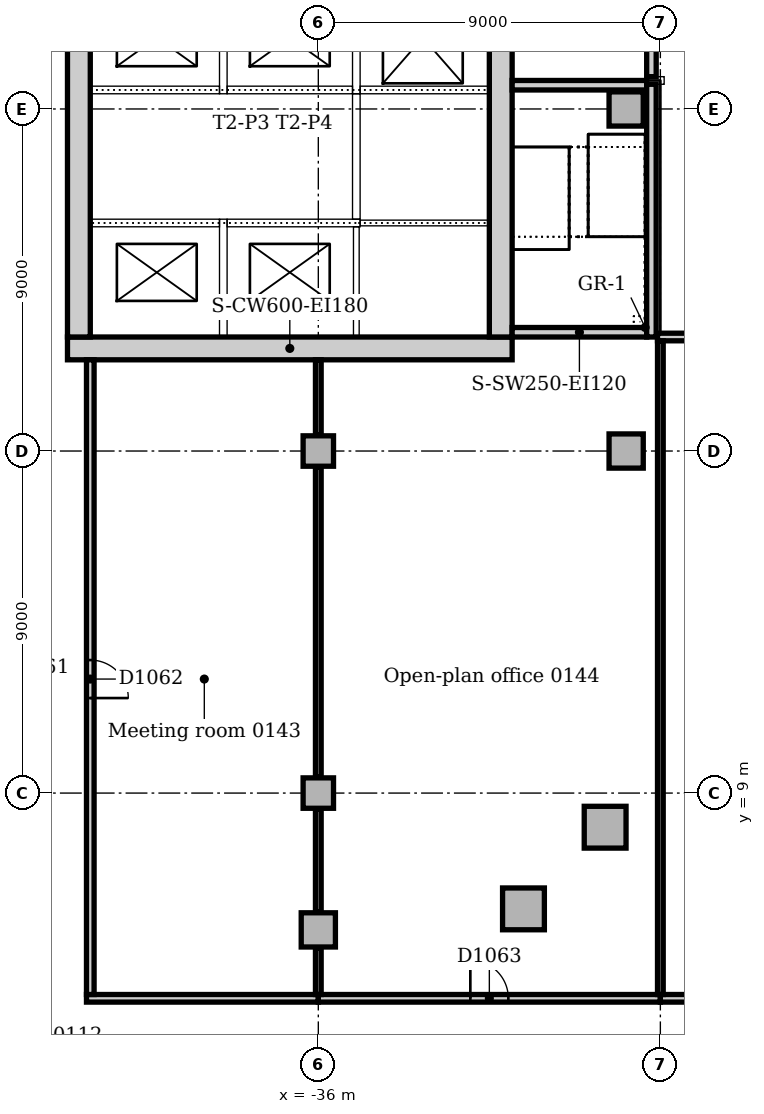
"""IFC4 building model, lengths in metres.
Left out: names, types, materials, properties, quantities, classifications, styles, units other than length and angle.
Written with IfcOpenShell. Run it as: python <this file> out.ifc"""

import sys

from ifc_helpers import new_model, si_unit, direction, frame, frame_2d, origin, origin_2d, place, context, subcontext, project, spatial, rectangle, extrude, element, fill, save


model = new_model("IFC4")
c1 = context("Model", 3, precision=1e-05, world=origin(), true_north=direction((0.0, 1.0)))
c2 = subcontext(c1, "Body", "Model", "MODEL_VIEW")
j1 = project(units=[si_unit("LENGTHUNIT", "METRE"), si_unit("PLANEANGLEUNIT", "RADIAN")], contexts=[c1])
p1 = place(None, origin())
s1 = spatial("IfcSite", under=j1, at=p1, CompositionType="ELEMENT")
p2 = place(p1, origin())
s2 = spatial("IfcBuilding", under=s1, at=p2, CompositionType="ELEMENT")
p3 = place(p2, frame((0.0, 0.0, 6.0)))
s3 = spatial("IfcBuildingStorey", under=s2, at=p3, CompositionType="ELEMENT", Elevation=6.0)
p4 = place(p3, frame((-42.6, 20.7, 0.0), z_axis=(0.0, 0.0, 1.0), x_axis=(1.0, 0.0, 0.0)))
e1 = element("IfcWall", 1, at=p4, inside=s3, PredefinedType="SOLIDWALL", context=c2, shape_type="SweptSolid", body=[
    extrude(rectangle(XDim=11.7, YDim=0.6, at=frame_2d((5.85, 0.0))), origin(), (0.0, 0.0, 1.0), 5.0),
])
p5 = place(p3, frame((-31.2, 21.0, 0.0), z_axis=(0.0, 0.0, 1.0), x_axis=(0.0, 1.0, 0.0)))
e2 = element("IfcWall", 2, at=p5, inside=s3, PredefinedType="SOLIDWALL", context=c2, shape_type="SweptSolid", body=[
    extrude(rectangle(XDim=9.5, YDim=0.6, at=frame_2d((4.75, 0.0))), origin(), (0.0, 0.0, 1.0), 5.0),
])
p6 = place(p5, frame((5.25, 0.0, 0.0)))
e3 = element("IfcOpeningElement", 3, at=p6, cuts=e2, PredefinedType="OPENING", context=c2, shape_type="SweptSolid", body=[
    extrude(rectangle(XDim=1.0, YDim=2.1, at=frame_2d((0.5, 1.05))), frame((0.0, 0.31, 0.0), z_axis=(0.0, -1.0, 0.0), x_axis=(1.0, 0.0, 0.0)), (0.0, 0.0, 1.0), 0.62),
])
p7 = place(p3, frame((-42.3, 30.5, 0.0), z_axis=(0.0, 0.0, 1.0), x_axis=(0.0, -1.0, 0.0)))
e4 = element("IfcWall", 4, at=p7, inside=s3, PredefinedType="SOLIDWALL", context=c2, shape_type="SweptSolid", body=[
    extrude(rectangle(XDim=9.5, YDim=0.6, at=frame_2d((4.75, 0.0))), origin(), (0.0, 0.0, 1.0), 5.0),
])
p8 = place(p7, frame((3.85, 0.0, 0.0)))
e5 = element("IfcOpeningElement", 5, at=p8, cuts=e4, PredefinedType="OPENING", context=c2, shape_type="SweptSolid", body=[
    extrude(rectangle(XDim=1.8, YDim=2.1, at=frame_2d((0.9, 1.05))), frame((0.0, 0.31, 0.0), z_axis=(0.0, -1.0, 0.0), x_axis=(1.0, 0.0, 0.0)), (0.0, 0.0, 1.0), 0.62),
])
p9 = place(p3, frame((-30.9, 21.125, 0.0), z_axis=(0.0, 0.0, 1.0), x_axis=(1.0, 0.0, 0.0)))
e6 = element("IfcWall", 6, at=p9, inside=s3, PredefinedType="SOLIDWALL", context=c2, shape_type="SweptSolid", body=[
    extrude(rectangle(XDim=3.54, YDim=0.25, at=frame_2d((1.77, 0.0))), origin(), (0.0, 0.0, 1.0), 5.0),
])
p10 = place(p3, frame((-27.36, 27.625, 0.0), z_axis=(0.0, 0.0, 1.0), x_axis=(-1.0, 0.0, 0.0)))
e7 = element("IfcWall", 7, at=p10, inside=s3, PredefinedType="SOLIDWALL", context=c2, shape_type="SweptSolid", body=[
    extrude(rectangle(XDim=3.54, YDim=0.25, at=frame_2d((1.77, 0.0))), origin(), (0.0, 0.0, 1.0), 5.0),
])
p11 = place(p10, frame((1.69, 0.0, 0.0)))
e8 = element("IfcOpeningElement", 8, at=p11, cuts=e7, PredefinedType="OPENING", context=c2, shape_type="SweptSolid", body=[
    extrude(rectangle(XDim=1.1, YDim=2.1, at=frame_2d((0.55, 1.05))), frame((0.0, 0.135, 0.0), z_axis=(0.0, -1.0, 0.0), x_axis=(1.0, 0.0, 0.0)), (0.0, 0.0, 1.0), 0.27),
])
p12 = place(p3, frame((-27.235, 21.0, 0.0), z_axis=(0.0, 0.0, 1.0), x_axis=(0.0, 1.0, 0.0)))
e9 = element("IfcWall", 9, at=p12, inside=s3, PredefinedType="SOLIDWALL", context=c2, shape_type="SweptSolid", body=[
    extrude(rectangle(XDim=6.65, YDim=0.25, at=frame_2d((3.325, 0.0))), origin(), (0.0, 0.0, 1.0), 5.0),
])
p13 = place(p3, frame((-27.235, 27.85, 0.0), z_axis=(0.0, 0.0, 1.0), x_axis=(0.0, 1.0, 0.0)))
e10 = element("IfcWall", 10, at=p13, inside=s3, PredefinedType="SOLIDWALL", context=c2, shape_type="SweptSolid", body=[
    extrude(rectangle(XDim=7.3, YDim=0.25, at=frame_2d((3.65, 0.0))), origin(), (0.0, 0.0, 1.0), 5.0),
])
for number, where, z_axis, x_axis in (
    (11, (-30.602, 5.953, 0.0), (0.0, 0.0, 1.0), (1.0, 0.0, 0.0)),
    (12, (-28.453, 8.102, 0.0), (0.0, 0.0, 1.0), (1.0, 0.0, 0.0)),
):
    element("IfcColumn", number, at=place(p3, frame(where, z_axis=z_axis, x_axis=x_axis)), inside=s3, PredefinedType="COLUMN", context=c2, shape_type="SweptSolid", body=[
        extrude(rectangle(XDim=1.1, YDim=1.1, at=origin_2d()), origin(), (0.0, 0.0, 1.0), 4.7),
    ])
for number, where, z_axis, x_axis in (
    (13, (-36.0, 5.4, 0.0), (0.0, 0.0, 1.0), (1.0, 0.0, 0.0)),
    (14, (-27.9, 18.0, 0.0), (0.0, 0.0, 1.0), (1.0, 0.0, 0.0)),
):
    element("IfcColumn", number, at=place(p3, frame(where, z_axis=z_axis, x_axis=x_axis)), inside=s3, PredefinedType="COLUMN", context=c2, shape_type="SweptSolid", body=[
        extrude(rectangle(XDim=0.9, YDim=0.9, at=origin_2d()), origin(), (0.0, 0.0, 1.0), 4.7),
    ])
p14 = place(p3, frame((-27.9, 27.0, 0.0), z_axis=(0.0, 0.0, 1.0), x_axis=(1.0, 0.0, 0.0)))
e15 = element("IfcColumn", 15, at=p14, inside=s3, PredefinedType="COLUMN", context=c2, shape_type="SweptSolid", body=[
    extrude(rectangle(XDim=0.9, YDim=0.9, at=origin_2d()), origin(), (0.0, 0.0, 1.0), 5.0),
])
for number, where, z_axis, x_axis in (
    (16, (-36.0, 9.0, 0.0), (0.0, 0.0, 1.0), (1.0, 0.0, 0.0)),
    (17, (-36.0, 18.0, 0.0), (0.0, 0.0, 1.0), (1.0, 0.0, 0.0)),
):
    element("IfcColumn", number, at=place(p3, frame(where, z_axis=z_axis, x_axis=x_axis)), inside=s3, PredefinedType="COLUMN", context=c2, shape_type="SweptSolid", body=[
        extrude(rectangle(XDim=0.8, YDim=0.8, at=origin_2d()), origin(), (0.0, 0.0, 1.0), 4.7),
    ])
p15 = place(p3, frame((-42.1, 3.6, 0.0), z_axis=(0.0, 0.0, 1.0), x_axis=(1.0, 0.0, 0.0)))
e18 = element("IfcWall", 18, at=p15, inside=s3, PredefinedType="PARTITIONING", context=c2, shape_type="SweptSolid", body=[
    extrude(rectangle(XDim=6.1, YDim=0.2, at=frame_2d((3.05, 0.0))), origin(), (0.0, 0.0, 1.0), 4.7),
])
p16 = place(p3, frame((-36.0, 3.6, 0.0), z_axis=(0.0, 0.0, 1.0), x_axis=(1.0, 0.0, 0.0)))
e19 = element("IfcWall", 19, at=p16, inside=s3, PredefinedType="PARTITIONING", context=c2, shape_type="SweptSolid", body=[
    extrude(rectangle(XDim=9.0, YDim=0.2, at=frame_2d((4.5, 0.0))), origin(), (0.0, 0.0, 1.0), 4.7),
])
p17 = place(p16, frame((4.0, 0.0, 0.0)))
e20 = element("IfcOpeningElement", 20, at=p17, cuts=e19, PredefinedType="OPENING", context=c2, shape_type="SweptSolid", body=[
    extrude(rectangle(XDim=1.0, YDim=2.1, at=frame_2d((0.5, 1.05))), frame((0.0, 0.11, 0.0), z_axis=(0.0, -1.0, 0.0), x_axis=(1.0, 0.0, 0.0)), (0.0, 0.0, 1.0), 0.22),
])
p18 = place(p3, frame((-42.0, 3.7, 0.0), z_axis=(0.0, 0.0, 1.0), x_axis=(0.0, 1.0, 0.0)))
e21 = element("IfcWall", 21, at=p18, inside=s3, PredefinedType="PARTITIONING", context=c2, shape_type="SweptSolid", body=[
    extrude(rectangle(XDim=16.7, YDim=0.2, at=frame_2d((8.35, 0.0))), origin(), (0.0, 0.0, 1.0), 4.7),
])
p19 = place(p18, frame((7.8, 0.0, 0.0)))
e22 = element("IfcOpeningElement", 22, at=p19, cuts=e21, PredefinedType="OPENING", context=c2, shape_type="SweptSolid", body=[
    extrude(rectangle(XDim=1.0, YDim=2.1, at=frame_2d((0.5, 1.05))), frame((0.0, 0.11, 0.0), z_axis=(0.0, -1.0, 0.0), x_axis=(1.0, 0.0, 0.0)), (0.0, 0.0, 1.0), 0.22),
])
p20 = place(p3, frame((-27.0, 3.6, 0.0), z_axis=(0.0, 0.0, 1.0), x_axis=(1.0, 0.0, 0.0)))
e23 = element("IfcWall", 23, at=p20, inside=s3, PredefinedType="PARTITIONING", context=c2, shape_type="SweptSolid", body=[
    extrude(rectangle(XDim=9.0, YDim=0.2, at=frame_2d((4.5, 0.0))), origin(), (0.0, 0.0, 1.0), 4.7),
])
p21 = place(p20, frame((4.0, 0.0, 0.0)))
e24 = element("IfcOpeningElement", 24, at=p21, cuts=e23, PredefinedType="OPENING", context=c2, shape_type="SweptSolid", body=[
    extrude(rectangle(XDim=1.0, YDim=2.1, at=frame_2d((0.5, 1.05))), frame((0.0, 0.11, 0.0), z_axis=(0.0, -1.0, 0.0), x_axis=(1.0, 0.0, 0.0)), (0.0, 0.0, 1.0), 0.22),
])
p22 = place(p3, frame((-27.075, 21.0, 0.0), z_axis=(0.0, 0.0, 1.0), x_axis=(1.0, 0.0, 0.0)))
e25 = element("IfcWall", 25, at=p22, inside=s3, PredefinedType="PARTITIONING", context=c2, shape_type="SweptSolid", body=[
    extrude(rectangle(XDim=9.075, YDim=0.2, at=frame_2d((4.537, 0.0))), origin(), (0.0, 0.0, 1.0), 4.7),
])
p23 = place(p3, frame((-27.0, 3.7, 0.0), z_axis=(0.0, 0.0, 1.0), x_axis=(0.0, 1.0, 0.0)))
e26 = element("IfcWall", 26, at=p23, inside=s3, PredefinedType="PARTITIONING", context=c2, shape_type="SweptSolid", body=[
    extrude(rectangle(XDim=17.2, YDim=0.15, at=frame_2d((8.6, 0.0))), origin(), (0.0, 0.0, 1.0), 4.7),
])
p24 = place(p3, frame((-36.0, 3.7, 0.0), z_axis=(0.0, 0.0, 1.0), x_axis=(0.0, 1.0, 0.0)))
e27 = element("IfcWall", 27, at=p24, inside=s3, PredefinedType="PARTITIONING", context=c2, shape_type="SweptSolid", body=[
    extrude(rectangle(XDim=1.23, YDim=0.15, at=frame_2d((0.615, 0.0))), origin(), (0.0, 0.0, 1.0), 4.7),
])
p25 = place(p3, frame((-36.0, 5.87, 0.0), z_axis=(0.0, 0.0, 1.0), x_axis=(0.0, 1.0, 0.0)))
e28 = element("IfcWall", 28, at=p25, inside=s3, PredefinedType="PARTITIONING", context=c2, shape_type="SweptSolid", body=[
    extrude(rectangle(XDim=2.71, YDim=0.15, at=frame_2d((1.355, 0.0))), origin(), (0.0, 0.0, 1.0), 4.7),
])
p26 = place(p3, frame((-36.0, 9.42, 0.0), z_axis=(0.0, 0.0, 1.0), x_axis=(0.0, 1.0, 0.0)))
e29 = element("IfcWall", 29, at=p26, inside=s3, PredefinedType="PARTITIONING", context=c2, shape_type="SweptSolid", body=[
    extrude(rectangle(XDim=8.16, YDim=0.15, at=frame_2d((4.08, 0.0))), origin(), (0.0, 0.0, 1.0), 4.7),
])
p27 = place(p3, frame((-36.0, 18.42, 0.0), z_axis=(0.0, 0.0, 1.0), x_axis=(0.0, 1.0, 0.0)))
e30 = element("IfcWall", 30, at=p27, inside=s3, PredefinedType="PARTITIONING", context=c2, shape_type="SweptSolid", body=[
    extrude(rectangle(XDim=1.98, YDim=0.15, at=frame_2d((0.99, 0.0))), origin(), (0.0, 0.0, 1.0), 4.7),
])
p28 = place(p3, frame((-38.5, 21.0, 0.0), z_axis=(0.0, 0.0, 1.0), x_axis=(0.0, 1.0, 0.0)))
e31 = element("IfcWall", 31, at=p28, inside=s3, PredefinedType="SOLIDWALL", context=c2, shape_type="SweptSolid", body=[
    extrude(rectangle(XDim=3.1, YDim=0.2, at=frame_2d((1.55, 0.0))), origin(), (0.0, 0.0, 1.0), 5.0),
])
p29 = place(p3, frame((-38.6, 24.0, 0.0), z_axis=(0.0, 0.0, 1.0), x_axis=(-1.0, 0.0, 0.0)))
e32 = element("IfcWall", 32, at=p29, inside=s3, PredefinedType="SOLIDWALL", context=c2, shape_type="SweptSolid", body=[
    extrude(rectangle(XDim=3.4, YDim=0.2, at=frame_2d((1.7, 0.0))), origin(), (0.0, 0.0, 1.0), 5.0),
])
p30 = place(p29, frame((0.8, 0.0, 0.0)))
e33 = element("IfcOpeningElement", 33, at=p30, cuts=e32, PredefinedType="OPENING", context=c2, shape_type="SweptSolid", body=[
    extrude(rectangle(XDim=1.1, YDim=2.1, at=frame_2d((0.55, 1.05))), frame((0.0, 0.11, 0.0), z_axis=(0.0, -1.0, 0.0), x_axis=(1.0, 0.0, 0.0)), (0.0, 0.0, 1.0), 0.22),
])
p31 = place(p3, frame((-34.9, 24.0, 0.0), z_axis=(0.0, 0.0, 1.0), x_axis=(-1.0, 0.0, 0.0)))
e34 = element("IfcWall", 34, at=p31, inside=s3, PredefinedType="SOLIDWALL", context=c2, shape_type="SweptSolid", body=[
    extrude(rectangle(XDim=3.5, YDim=0.2, at=frame_2d((1.75, 0.0))), origin(), (0.0, 0.0, 1.0), 5.0),
])
p32 = place(p31, frame((1.3, 0.0, 0.0)))
e35 = element("IfcOpeningElement", 35, at=p32, cuts=e34, PredefinedType="OPENING", context=c2, shape_type="SweptSolid", body=[
    extrude(rectangle(XDim=1.1, YDim=2.1, at=frame_2d((0.55, 1.05))), frame((0.0, 0.11, 0.0), z_axis=(0.0, -1.0, 0.0), x_axis=(1.0, 0.0, 0.0)), (0.0, 0.0, 1.0), 0.22),
])
p33 = place(p3, frame((-38.5, 27.4, 0.0), z_axis=(0.0, 0.0, 1.0), x_axis=(0.0, 1.0, 0.0)))
e36 = element("IfcWall", 36, at=p33, inside=s3, PredefinedType="SOLIDWALL", context=c2, shape_type="SweptSolid", body=[
    extrude(rectangle(XDim=2.85, YDim=0.2, at=frame_2d((1.425, 0.0))), origin(), (0.0, 0.0, 1.0), 5.0),
])
p34 = place(p3, frame((-42.0, 27.5, 0.0), z_axis=(0.0, 0.0, 1.0), x_axis=(1.0, 0.0, 0.0)))
e37 = element("IfcWall", 37, at=p34, inside=s3, PredefinedType="SOLIDWALL", context=c2, shape_type="SweptSolid", body=[
    extrude(rectangle(XDim=3.4, YDim=0.2, at=frame_2d((1.7, 0.0))), origin(), (0.0, 0.0, 1.0), 5.0),
])
p35 = place(p34, frame((1.5, 0.0, 0.0)))
e38 = element("IfcOpeningElement", 38, at=p35, cuts=e37, PredefinedType="OPENING", context=c2, shape_type="SweptSolid", body=[
    extrude(rectangle(XDim=1.1, YDim=2.1, at=frame_2d((0.55, 1.05))), frame((0.0, 0.11, 0.0), z_axis=(0.0, -1.0, 0.0), x_axis=(1.0, 0.0, 0.0)), (0.0, 0.0, 1.0), 0.22),
])
p36 = place(p3, frame((-35.0, 27.4, 0.0), z_axis=(0.0, 0.0, 1.0), x_axis=(0.0, 1.0, 0.0)))
e39 = element("IfcWall", 39, at=p36, inside=s3, PredefinedType="SOLIDWALL", context=c2, shape_type="SweptSolid", body=[
    extrude(rectangle(XDim=2.85, YDim=0.2, at=frame_2d((1.425, 0.0))), origin(), (0.0, 0.0, 1.0), 5.0),
])
p37 = place(p3, frame((-38.4, 27.5, 0.0), z_axis=(0.0, 0.0, 1.0), x_axis=(1.0, 0.0, 0.0)))
e40 = element("IfcWall", 40, at=p37, inside=s3, PredefinedType="SOLIDWALL", context=c2, shape_type="SweptSolid", body=[
    extrude(rectangle(XDim=3.3, YDim=0.2, at=frame_2d((1.65, 0.0))), origin(), (0.0, 0.0, 1.0), 5.0),
])
p38 = place(p37, frame((1.1, 0.0, 0.0)))
e41 = element("IfcOpeningElement", 41, at=p38, cuts=e40, PredefinedType="OPENING", context=c2, shape_type="SweptSolid", body=[
    extrude(rectangle(XDim=1.1, YDim=2.1, at=frame_2d((0.55, 1.05))), frame((0.0, 0.11, 0.0), z_axis=(0.0, -1.0, 0.0), x_axis=(1.0, 0.0, 0.0)), (0.0, 0.0, 1.0), 0.22),
])
p39 = place(p3, frame((-34.9, 27.5, 0.0), z_axis=(0.0, 0.0, 1.0), x_axis=(1.0, 0.0, 0.0)))
e42 = element("IfcWall", 42, at=p39, inside=s3, PredefinedType="SOLIDWALL", context=c2, shape_type="SweptSolid", body=[
    extrude(rectangle(XDim=3.4, YDim=0.2, at=frame_2d((1.7, 0.0))), origin(), (0.0, 0.0, 1.0), 5.0),
])
p40 = place(p39, frame((1.1, 0.0, 0.0)))
e43 = element("IfcOpeningElement", 43, at=p40, cuts=e42, PredefinedType="OPENING", context=c2, shape_type="SweptSolid", body=[
    extrude(rectangle(XDim=1.1, YDim=2.1, at=frame_2d((0.55, 1.05))), frame((0.0, 0.11, 0.0), z_axis=(0.0, -1.0, 0.0), x_axis=(1.0, 0.0, 0.0)), (0.0, 0.0, 1.0), 0.22),
])
p41 = place(p3, frame((-35.0, 24.1, 0.0), z_axis=(0.0, 0.0, 1.0), x_axis=(0.0, 1.0, 0.0)))
e44 = element("IfcWall", 44, at=p41, inside=s3, PredefinedType="SOLIDWALL", context=c2, shape_type="SweptSolid", body=[
    extrude(rectangle(XDim=3.3, YDim=0.2, at=frame_2d((1.65, 0.0))), origin(), (0.0, 0.0, 1.0), 5.0),
])
p42 = place(p41, frame((1.15, 0.0, 0.0)))
e45 = element("IfcOpeningElement", 45, at=p42, cuts=e44, PredefinedType="OPENING", context=c2, shape_type="SweptSolid", body=[
    extrude(rectangle(XDim=1.0, YDim=2.1, at=frame_2d((0.5, 1.05))), frame((0.0, 0.11, 0.0), z_axis=(0.0, -1.0, 0.0), x_axis=(1.0, 0.0, 0.0)), (0.0, 0.0, 1.0), 0.22),
])
p43 = place(p3, frame((-27.36, 27.75, 0.0), z_axis=(0.0, 0.0, 1.0), x_axis=(1.0, 0.0, 0.0)))
e46 = element("IfcWall", 46, at=p43, inside=s3, PredefinedType="SOLIDWALL", context=c2, shape_type="SweptSolid", body=[
    extrude(rectangle(XDim=0.46, YDim=0.2, at=frame_2d((0.23, 0.0))), origin(), (0.0, 0.0, 1.0), 5.0),
])
p44 = place(p3, frame((-35.0, 21.0, 0.0), z_axis=(0.0, 0.0, 1.0), x_axis=(0.0, 1.0, 0.0)))
e47 = element("IfcWall", 47, at=p44, inside=s3, PredefinedType="SOLIDWALL", context=c2, shape_type="SweptSolid", body=[
    extrude(rectangle(XDim=2.9, YDim=0.15, at=frame_2d((1.45, 0.0))), origin(), (0.0, 0.0, 1.0), 5.0),
])
p45 = place(p3, frame((-31.5, 24.0, 0.0), z_axis=(0.0, 0.0, 1.0), x_axis=(-1.0, 0.0, 0.0)))
e48 = element("IfcWall", 48, at=p45, inside=s3, PredefinedType="SOLIDWALL", context=c2, shape_type="SweptSolid", body=[
    extrude(rectangle(XDim=3.4, YDim=0.15, at=frame_2d((1.7, 0.0))), origin(), (0.0, 0.0, 1.0), 5.0),
])
p46 = place(p19, frame((1.0, 0.0, 0.0), z_axis=(0.0, 0.0, 1.0), x_axis=(-1.0, 0.0, 0.0)))
e49 = element("IfcDoor", 49, at=p46, inside=s3, OperationType="SINGLE_SWING_RIGHT", PredefinedType="DOOR", context=c2, shape_type="SweptSolid", body=[
    extrude(rectangle(XDim=1.0, YDim=2.1, at=frame_2d((0.5, 1.05))), frame((0.0, 0.025, 0.0), z_axis=(0.0, -1.0, 0.0), x_axis=(1.0, 0.0, 0.0)), (0.0, 0.0, 1.0), 0.05),
])
fill(e22, e49)
p47 = place(p17, origin())
e50 = element("IfcDoor", 50, at=p47, inside=s3, OperationType="SINGLE_SWING_LEFT", PredefinedType="DOOR", context=c2, shape_type="SweptSolid", body=[
    extrude(rectangle(XDim=1.0, YDim=2.1, at=frame_2d((0.5, 1.05))), frame((0.0, 0.025, 0.0), z_axis=(0.0, -1.0, 0.0), x_axis=(1.0, 0.0, 0.0)), (0.0, 0.0, 1.0), 0.05),
])
fill(e20, e50)
p48 = place(p30, origin())
e51 = element("IfcDoor", 51, at=p48, inside=s3, OperationType="SLIDING_TO_LEFT", PredefinedType="DOOR", context=c2, shape_type="SweptSolid", body=[
    extrude(rectangle(XDim=1.1, YDim=2.1, at=frame_2d((0.55, 1.05))), frame((0.0, 0.025, 0.0), z_axis=(0.0, -1.0, 0.0), x_axis=(1.0, 0.0, 0.0)), (0.0, 0.0, 1.0), 0.05),
])
fill(e33, e51)
p49 = place(p32, origin())
e52 = element("IfcDoor", 52, at=p49, inside=s3, OperationType="SLIDING_TO_LEFT", PredefinedType="DOOR", context=c2, shape_type="SweptSolid", body=[
    extrude(rectangle(XDim=1.1, YDim=2.1, at=frame_2d((0.55, 1.05))), frame((0.0, 0.025, 0.0), z_axis=(0.0, -1.0, 0.0), x_axis=(1.0, 0.0, 0.0)), (0.0, 0.0, 1.0), 0.05),
])
fill(e35, e52)
p50 = place(p35, origin())
e53 = element("IfcDoor", 53, at=p50, inside=s3, OperationType="SLIDING_TO_LEFT", PredefinedType="DOOR", context=c2, shape_type="SweptSolid", body=[
    extrude(rectangle(XDim=1.1, YDim=2.1, at=frame_2d((0.55, 1.05))), frame((0.0, 0.025, 0.0), z_axis=(0.0, -1.0, 0.0), x_axis=(1.0, 0.0, 0.0)), (0.0, 0.0, 1.0), 0.05),
])
fill(e38, e53)
p51 = place(p38, origin())
e54 = element("IfcDoor", 54, at=p51, inside=s3, OperationType="SLIDING_TO_LEFT", PredefinedType="DOOR", context=c2, shape_type="SweptSolid", body=[
    extrude(rectangle(XDim=1.1, YDim=2.1, at=frame_2d((0.55, 1.05))), frame((0.0, 0.025, 0.0), z_axis=(0.0, -1.0, 0.0), x_axis=(1.0, 0.0, 0.0)), (0.0, 0.0, 1.0), 0.05),
])
fill(e41, e54)
p52 = place(p40, origin())
e55 = element("IfcDoor", 55, at=p52, inside=s3, OperationType="SLIDING_TO_LEFT", PredefinedType="DOOR", context=c2, shape_type="SweptSolid", body=[
    extrude(rectangle(XDim=1.1, YDim=2.1, at=frame_2d((0.55, 1.05))), frame((0.0, 0.025, 0.0), z_axis=(0.0, -1.0, 0.0), x_axis=(1.0, 0.0, 0.0)), (0.0, 0.0, 1.0), 0.05),
])
fill(e43, e55)
p53 = place(p42, origin())
e56 = element("IfcDoor", 56, at=p53, inside=s3, OperationType="SINGLE_SWING_RIGHT", PredefinedType="DOOR", context=c2, shape_type="SweptSolid", body=[
    extrude(rectangle(XDim=1.0, YDim=2.1, at=frame_2d((0.5, 1.05))), frame((0.0, 0.025, 0.0), z_axis=(0.0, -1.0, 0.0), x_axis=(1.0, 0.0, 0.0)), (0.0, 0.0, 1.0), 0.05),
])
fill(e45, e56)
p54 = place(p6, frame((1.0, 0.0, 0.0), z_axis=(0.0, 0.0, 1.0), x_axis=(-1.0, 0.0, 0.0)))
e57 = element("IfcDoor", 57, at=p54, inside=s3, OperationType="SINGLE_SWING_LEFT", PredefinedType="DOOR", context=c2, shape_type="SweptSolid", body=[
    extrude(rectangle(XDim=1.0, YDim=2.1, at=frame_2d((0.5, 1.05))), frame((0.0, 0.025, 0.0), z_axis=(0.0, -1.0, 0.0), x_axis=(1.0, 0.0, 0.0)), (0.0, 0.0, 1.0), 0.05),
])
fill(e3, e57)
p55 = place(p11, origin())
e58 = element("IfcDoor", 58, at=p55, inside=s3, OperationType="SINGLE_SWING_RIGHT", PredefinedType="DOOR", context=c2, shape_type="SweptSolid", body=[
    extrude(rectangle(XDim=1.1, YDim=2.1, at=frame_2d((0.55, 1.05))), frame((0.0, 0.025, 0.0), z_axis=(0.0, -1.0, 0.0), x_axis=(1.0, 0.0, 0.0)), (0.0, 0.0, 1.0), 0.05),
])
fill(e8, e58)
p56 = place(p8, origin())
e59 = element("IfcDoor", 59, at=p56, inside=s3, OperationType="DOUBLE_DOOR_SINGLE_SWING", PredefinedType="DOOR", context=c2, shape_type="SweptSolid", body=[
    extrude(rectangle(XDim=1.8, YDim=2.1, at=frame_2d((0.9, 1.05))), frame((0.0, 0.025, 0.0), z_axis=(0.0, -1.0, 0.0), x_axis=(1.0, 0.0, 0.0)), (0.0, 0.0, 1.0), 0.05),
])
fill(e5, e59)
save(model, sys.argv[1])
